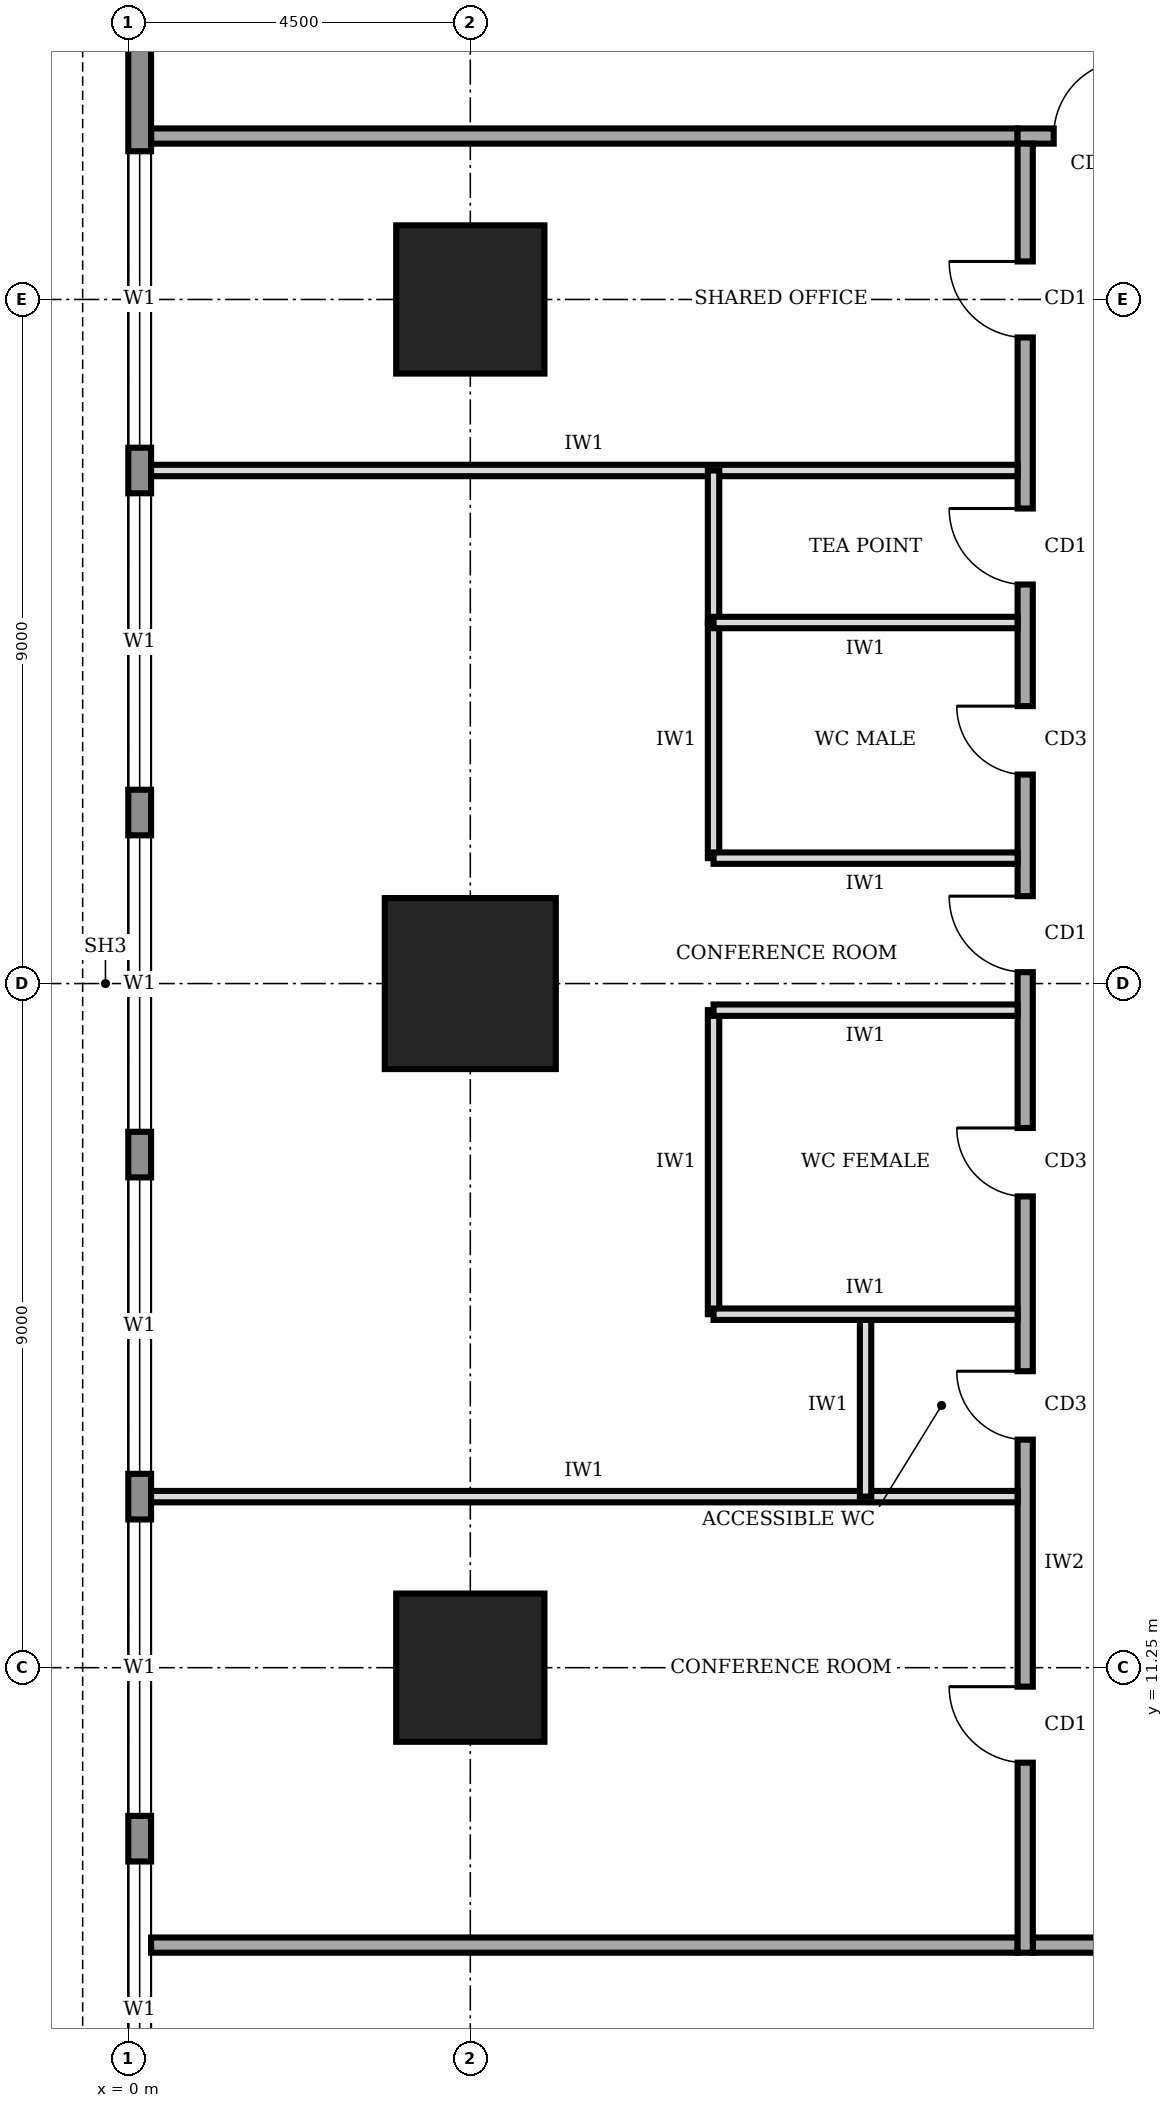
"""IFC4 building model, lengths in metres.
Left out: names, types, materials, properties, quantities, classifications, styles, units other than length and angle.
Written with IfcOpenShell. Run it as: python <this file> out.ifc"""

import sys

from ifc_helpers import new_model, si_unit, direction, frame, frame_2d, origin, origin_2d, place, context, subcontext, project, spatial, rectangle, extrude, element, fill, save


model = new_model("IFC4")
c1 = context("Model", 3, precision=1e-05, world=origin(), true_north=direction((0.0, 1.0)))
c2 = subcontext(c1, "Body", "Model", "MODEL_VIEW")
j1 = project(units=[si_unit("LENGTHUNIT", "METRE"), si_unit("PLANEANGLEUNIT", "RADIAN")], contexts=[c1])
p1 = place(None, origin())
s1 = spatial("IfcSite", under=j1, at=p1, CompositionType="ELEMENT")
p2 = place(p1, origin())
s2 = spatial("IfcBuilding", under=s1, at=p2, CompositionType="ELEMENT")
p3 = place(p2, frame((0.0, 0.0, 213.0)))
s3 = spatial("IfcBuildingStorey", under=s2, at=p3, CompositionType="ELEMENT", Elevation=213.0)
p4 = place(p3, frame((4.5, 11.25, 0.0), z_axis=(0.0, 0.0, 1.0), x_axis=(1.0, 0.0, 0.0)))
e1 = element("IfcColumn", 1, at=p4, inside=s3, PredefinedType="COLUMN", context=c2, shape_type="SweptSolid", body=[
    extrude(rectangle(XDim=1.95, YDim=1.95, at=origin_2d()), origin(), (0.0, 0.0, 1.0), 4.0),
])
p5 = place(p3, frame((4.5, 20.25, 0.0), z_axis=(0.0, 0.0, 1.0), x_axis=(1.0, 0.0, 0.0)))
e2 = element("IfcColumn", 2, at=p5, inside=s3, PredefinedType="COLUMN", context=c2, shape_type="SweptSolid", body=[
    extrude(rectangle(XDim=2.25, YDim=2.25, at=origin_2d()), origin(), (0.0, 0.0, 1.0), 4.0),
])
p6 = place(p3, frame((4.5, 29.25, 0.0), z_axis=(0.0, 0.0, 1.0), x_axis=(1.0, 0.0, 0.0)))
e3 = element("IfcColumn", 3, at=p6, inside=s3, PredefinedType="COLUMN", context=c2, shape_type="SweptSolid", body=[
    extrude(rectangle(XDim=1.95, YDim=1.95, at=origin_2d()), origin(), (0.0, 0.0, 1.0), 4.0),
])
p7 = place(p3, frame((0.15, 35.98, 0.0), z_axis=(0.0, 0.0, 1.0), x_axis=(0.0, -1.0, 0.0)))
e4 = element("IfcWall", 4, at=p7, inside=s3, PredefinedType="STANDARD", context=c2, shape_type="SweptSolid", body=[
    extrude(rectangle(XDim=31.46, YDim=0.3, at=frame_2d((15.73, 0.0))), origin(), (0.0, 0.0, 1.0), 3.75),
])
p8 = place(p7, frame((27.28, 0.0, 0.9)))
e5 = element("IfcOpeningElement", 5, at=p8, cuts=e4, PredefinedType="OPENING", context=c2, shape_type="SweptSolid", body=[
    extrude(rectangle(XDim=3.9, YDim=2.2, at=frame_2d((1.95, 1.1))), frame((0.0, 0.16, 0.0), z_axis=(0.0, -1.0, 0.0), x_axis=(1.0, 0.0, 0.0)), (0.0, 0.0, 1.0), 0.32),
])
p9 = place(p7, frame((22.78, 0.0, 0.9)))
e6 = element("IfcOpeningElement", 6, at=p9, cuts=e4, PredefinedType="OPENING", context=c2, shape_type="SweptSolid", body=[
    extrude(rectangle(XDim=3.9, YDim=2.2, at=frame_2d((1.95, 1.1))), frame((0.0, 0.16, 0.0), z_axis=(0.0, -1.0, 0.0), x_axis=(1.0, 0.0, 0.0)), (0.0, 0.0, 1.0), 0.32),
])
p10 = place(p7, frame((18.28, 0.0, 0.9)))
e7 = element("IfcOpeningElement", 7, at=p10, cuts=e4, PredefinedType="OPENING", context=c2, shape_type="SweptSolid", body=[
    extrude(rectangle(XDim=3.9, YDim=2.2, at=frame_2d((1.95, 1.1))), frame((0.0, 0.16, 0.0), z_axis=(0.0, -1.0, 0.0), x_axis=(1.0, 0.0, 0.0)), (0.0, 0.0, 1.0), 0.32),
])
p11 = place(p7, frame((13.78, 0.0, 0.9)))
e8 = element("IfcOpeningElement", 8, at=p11, cuts=e4, PredefinedType="OPENING", context=c2, shape_type="SweptSolid", body=[
    extrude(rectangle(XDim=3.9, YDim=2.2, at=frame_2d((1.95, 1.1))), frame((0.0, 0.16, 0.0), z_axis=(0.0, -1.0, 0.0), x_axis=(1.0, 0.0, 0.0)), (0.0, 0.0, 1.0), 0.32),
])
p12 = place(p7, frame((9.28, 0.0, 0.9)))
e9 = element("IfcOpeningElement", 9, at=p12, cuts=e4, PredefinedType="OPENING", context=c2, shape_type="SweptSolid", body=[
    extrude(rectangle(XDim=3.9, YDim=2.2, at=frame_2d((1.95, 1.1))), frame((0.0, 0.16, 0.0), z_axis=(0.0, -1.0, 0.0), x_axis=(1.0, 0.0, 0.0)), (0.0, 0.0, 1.0), 0.32),
])
p13 = place(p7, frame((4.78, 0.0, 0.9)))
e10 = element("IfcOpeningElement", 10, at=p13, cuts=e4, PredefinedType="OPENING", context=c2, shape_type="SweptSolid", body=[
    extrude(rectangle(XDim=3.9, YDim=2.2, at=frame_2d((1.95, 1.1))), frame((0.0, 0.16, 0.0), z_axis=(0.0, -1.0, 0.0), x_axis=(1.0, 0.0, 0.0)), (0.0, 0.0, 1.0), 0.32),
])
p14 = place(p3, frame((11.9, 7.6, 0.0), z_axis=(0.0, 0.0, 1.0), x_axis=(1.0, 0.0, 0.0)))
e11 = element("IfcWall", 11, at=p14, inside=s3, PredefinedType="SOLIDWALL", context=c2, shape_type="SweptSolid", body=[
    extrude(rectangle(XDim=16.9, YDim=0.2, at=frame_2d((8.45, 0.0))), origin(), (0.0, 0.0, 1.0), 3.75),
])
p15 = place(p3, frame((28.6, 31.4, 0.0), z_axis=(0.0, 0.0, 1.0), x_axis=(-1.0, 0.0, 0.0)))
e12 = element("IfcWall", 12, at=p15, inside=s3, PredefinedType="SOLIDWALL", context=c2, shape_type="SweptSolid", body=[
    extrude(rectangle(XDim=16.9, YDim=0.2, at=frame_2d((8.45, 0.0))), origin(), (0.0, 0.0, 1.0), 3.75),
])
p16 = place(p15, frame((15.425, 0.0, 0.0)))
e13 = element("IfcOpeningElement", 13, at=p16, cuts=e12, PredefinedType="OPENING", context=c2, shape_type="SweptSolid", body=[
    extrude(rectangle(XDim=1.0, YDim=2.1, at=frame_2d((0.5, 1.05))), frame((0.0, 0.11, 0.0), z_axis=(0.0, -1.0, 0.0), x_axis=(1.0, 0.0, 0.0)), (0.0, 0.0, 1.0), 0.22),
])
p17 = place(p15, frame((12.35, 0.0, 0.0)))
e14 = element("IfcOpeningElement", 14, at=p17, cuts=e12, PredefinedType="OPENING", context=c2, shape_type="SweptSolid", body=[
    extrude(rectangle(XDim=1.0, YDim=2.1, at=frame_2d((0.5, 1.05))), frame((0.0, 0.11, 0.0), z_axis=(0.0, -1.0, 0.0), x_axis=(1.0, 0.0, 0.0)), (0.0, 0.0, 1.0), 0.22),
])
p18 = place(p15, frame((5.6, 0.0, 0.0)))
e15 = element("IfcOpeningElement", 15, at=p18, cuts=e12, PredefinedType="OPENING", context=c2, shape_type="SweptSolid", body=[
    extrude(rectangle(XDim=1.0, YDim=2.1, at=frame_2d((0.5, 1.05))), frame((0.0, 0.11, 0.0), z_axis=(0.0, -1.0, 0.0), x_axis=(1.0, 0.0, 0.0)), (0.0, 0.0, 1.0), 0.22),
])
p19 = place(p15, frame((0.275, 0.0, 0.0)))
e16 = element("IfcOpeningElement", 16, at=p19, cuts=e12, PredefinedType="OPENING", context=c2, shape_type="SweptSolid", body=[
    extrude(rectangle(XDim=1.0, YDim=2.1, at=frame_2d((0.5, 1.05))), frame((0.0, 0.11, 0.0), z_axis=(0.0, -1.0, 0.0), x_axis=(1.0, 0.0, 0.0)), (0.0, 0.0, 1.0), 0.22),
])
p20 = place(p3, frame((11.8, 31.3, 0.0), z_axis=(0.0, 0.0, 1.0), x_axis=(0.0, -1.0, 0.0)))
e17 = element("IfcWall", 17, at=p20, inside=s3, PredefinedType="SOLIDWALL", context=c2, shape_type="SweptSolid", body=[
    extrude(rectangle(XDim=23.8, YDim=0.2, at=frame_2d((11.9, 0.0))), origin(), (0.0, 0.0, 1.0), 3.75),
])
p21 = place(p20, frame((20.3, 0.0, 0.0)))
e18 = element("IfcOpeningElement", 18, at=p21, cuts=e17, PredefinedType="OPENING", context=c2, shape_type="SweptSolid", body=[
    extrude(rectangle(XDim=1.0, YDim=2.1, at=frame_2d((0.5, 1.05))), frame((0.0, 0.11, 0.0), z_axis=(0.0, -1.0, 0.0), x_axis=(1.0, 0.0, 0.0)), (0.0, 0.0, 1.0), 0.22),
])
p22 = place(p20, frame((16.15, 0.0, 0.0)))
e19 = element("IfcOpeningElement", 19, at=p22, cuts=e17, PredefinedType="OPENING", context=c2, shape_type="SweptSolid", body=[
    extrude(rectangle(XDim=0.9, YDim=2.1, at=frame_2d((0.45, 1.05))), frame((0.0, 0.11, 0.0), z_axis=(0.0, -1.0, 0.0), x_axis=(1.0, 0.0, 0.0)), (0.0, 0.0, 1.0), 0.22),
])
p23 = place(p20, frame((12.95, 0.0, 0.0)))
e20 = element("IfcOpeningElement", 20, at=p23, cuts=e17, PredefinedType="OPENING", context=c2, shape_type="SweptSolid", body=[
    extrude(rectangle(XDim=0.9, YDim=2.1, at=frame_2d((0.45, 1.05))), frame((0.0, 0.11, 0.0), z_axis=(0.0, -1.0, 0.0), x_axis=(1.0, 0.0, 0.0)), (0.0, 0.0, 1.0), 0.22),
])
p24 = place(p20, frame((7.4, 0.0, 0.0)))
e21 = element("IfcOpeningElement", 21, at=p24, cuts=e17, PredefinedType="OPENING", context=c2, shape_type="SweptSolid", body=[
    extrude(rectangle(XDim=0.9, YDim=2.1, at=frame_2d((0.45, 1.05))), frame((0.0, 0.11, 0.0), z_axis=(0.0, -1.0, 0.0), x_axis=(1.0, 0.0, 0.0)), (0.0, 0.0, 1.0), 0.22),
])
p25 = place(p20, frame((4.8, 0.0, 0.0)))
e22 = element("IfcOpeningElement", 22, at=p25, cuts=e17, PredefinedType="OPENING", context=c2, shape_type="SweptSolid", body=[
    extrude(rectangle(XDim=1.0, YDim=2.1, at=frame_2d((0.5, 1.05))), frame((0.0, 0.11, 0.0), z_axis=(0.0, -1.0, 0.0), x_axis=(1.0, 0.0, 0.0)), (0.0, 0.0, 1.0), 0.22),
])
p26 = place(p20, frame((9.9, 0.0, 0.0)))
e23 = element("IfcOpeningElement", 23, at=p26, cuts=e17, PredefinedType="OPENING", context=c2, shape_type="SweptSolid", body=[
    extrude(rectangle(XDim=1.0, YDim=2.1, at=frame_2d((0.5, 1.05))), frame((0.0, 0.11, 0.0), z_axis=(0.0, -1.0, 0.0), x_axis=(1.0, 0.0, 0.0)), (0.0, 0.0, 1.0), 0.22),
])
p27 = place(p20, frame((1.55, 0.0, 0.0)))
e24 = element("IfcOpeningElement", 24, at=p27, cuts=e17, PredefinedType="OPENING", context=c2, shape_type="SweptSolid", body=[
    extrude(rectangle(XDim=1.0, YDim=2.1, at=frame_2d((0.5, 1.05))), frame((0.0, 0.11, 0.0), z_axis=(0.0, -1.0, 0.0), x_axis=(1.0, 0.0, 0.0)), (0.0, 0.0, 1.0), 0.22),
])
for number, where, z_axis, x_axis in (
    (25, (0.3, 7.6, 0.0), (0.0, 0.0, 1.0), (1.0, 0.0, 0.0)),
    (26, (0.3, 31.4, 0.0), (0.0, 0.0, 1.0), (1.0, 0.0, 0.0)),
):
    element("IfcWall", number, at=place(p3, frame(where, z_axis=z_axis, x_axis=x_axis)), inside=s3, PredefinedType="SOLIDWALL", context=c2, shape_type="SweptSolid", body=[
        extrude(rectangle(XDim=11.4, YDim=0.2, at=frame_2d((5.7, 0.0))), origin(), (0.0, 0.0, 1.0), 3.75),
    ])
for number, where, z_axis, x_axis in (
    (27, (0.3, 13.5, 0.0), (0.0, 0.0, 1.0), (1.0, 0.0, 0.0)),
    (28, (0.3, 27.0, 0.0), (0.0, 0.0, 1.0), (1.0, 0.0, 0.0)),
):
    element("IfcWall", number, at=place(p3, frame(where, z_axis=z_axis, x_axis=x_axis)), inside=s3, PredefinedType="PARTITIONING", context=c2, shape_type="SweptSolid", body=[
        extrude(rectangle(XDim=11.4, YDim=0.15, at=frame_2d((5.7, 0.0))), origin(), (0.0, 0.0, 1.0), 3.75),
    ])
p28 = place(p3, frame((11.7, 15.9, 0.0), z_axis=(0.0, 0.0, 1.0), x_axis=(-1.0, 0.0, 0.0)))
e29 = element("IfcWall", 29, at=p28, inside=s3, PredefinedType="PARTITIONING", context=c2, shape_type="SweptSolid", body=[
    extrude(rectangle(XDim=4.0, YDim=0.15, at=frame_2d((2.0, 0.0))), origin(), (0.0, 0.0, 1.0), 3.75),
])
p29 = place(p3, frame((11.7, 19.9, 0.0), z_axis=(0.0, 0.0, 1.0), x_axis=(-1.0, 0.0, 0.0)))
e30 = element("IfcWall", 30, at=p29, inside=s3, PredefinedType="PARTITIONING", context=c2, shape_type="SweptSolid", body=[
    extrude(rectangle(XDim=4.0, YDim=0.15, at=frame_2d((2.0, 0.0))), origin(), (0.0, 0.0, 1.0), 2.85),
])
for number, where, z_axis, x_axis in (
    (31, (11.7, 21.9, 0.0), (0.0, 0.0, 1.0), (-1.0, 0.0, 0.0)),
    (32, (11.7, 25.0, 0.0), (0.0, 0.0, 1.0), (-1.0, 0.0, 0.0)),
):
    element("IfcWall", number, at=place(p3, frame(where, z_axis=z_axis, x_axis=x_axis)), inside=s3, PredefinedType="PARTITIONING", context=c2, shape_type="SweptSolid", body=[
        extrude(rectangle(XDim=4.0, YDim=0.15, at=frame_2d((2.0, 0.0))), origin(), (0.0, 0.0, 1.0), 3.75),
    ])
p30 = place(p3, frame((9.7, 13.5, 0.0), z_axis=(0.0, 0.0, 1.0), x_axis=(0.0, 1.0, 0.0)))
e33 = element("IfcWall", 33, at=p30, inside=s3, PredefinedType="PARTITIONING", context=c2, shape_type="SweptSolid", body=[
    extrude(rectangle(XDim=2.4, YDim=0.15, at=frame_2d((1.2, 0.0))), origin(), (0.0, 0.0, 1.0), 3.75),
])
p31 = place(p3, frame((7.7, 15.9, 0.0), z_axis=(0.0, 0.0, 1.0), x_axis=(0.0, 1.0, 0.0)))
e34 = element("IfcWall", 34, at=p31, inside=s3, PredefinedType="PARTITIONING", context=c2, shape_type="SweptSolid", body=[
    extrude(rectangle(XDim=4.0, YDim=0.15, at=frame_2d((2.0, 0.0))), origin(), (0.0, 0.0, 1.0), 3.75),
])
p32 = place(p3, frame((7.7, 21.9, 0.0), z_axis=(0.0, 0.0, 1.0), x_axis=(0.0, 1.0, 0.0)))
e35 = element("IfcWall", 35, at=p32, inside=s3, PredefinedType="PARTITIONING", context=c2, shape_type="SweptSolid", body=[
    extrude(rectangle(XDim=3.1, YDim=0.15, at=frame_2d((1.55, 0.0))), origin(), (0.0, 0.0, 1.0), 3.75),
])
p33 = place(p3, frame((7.7, 25.0, 0.0), z_axis=(0.0, 0.0, 1.0), x_axis=(0.0, 1.0, 0.0)))
e36 = element("IfcWall", 36, at=p33, inside=s3, PredefinedType="PARTITIONING", context=c2, shape_type="SweptSolid", body=[
    extrude(rectangle(XDim=2.0, YDim=0.15, at=frame_2d((1.0, 0.0))), origin(), (0.0, 0.0, 1.0), 3.75),
])
p34 = place(p8, origin())
e37 = element("IfcWindow", 37, at=p34, inside=s3, PartitioningType="SINGLE_PANEL", PredefinedType="WINDOW", context=c2, shape_type="SweptSolid", body=[
    extrude(rectangle(XDim=3.9, YDim=2.2, at=frame_2d((1.95, 1.1))), frame((0.0, 0.03, 0.0), z_axis=(0.0, -1.0, 0.0), x_axis=(1.0, 0.0, 0.0)), (0.0, 0.0, 1.0), 0.06),
])
fill(e5, e37)
p35 = place(p9, origin())
e38 = element("IfcWindow", 38, at=p35, inside=s3, PartitioningType="SINGLE_PANEL", PredefinedType="WINDOW", context=c2, shape_type="SweptSolid", body=[
    extrude(rectangle(XDim=3.9, YDim=2.2, at=frame_2d((1.95, 1.1))), frame((0.0, 0.03, 0.0), z_axis=(0.0, -1.0, 0.0), x_axis=(1.0, 0.0, 0.0)), (0.0, 0.0, 1.0), 0.06),
])
fill(e6, e38)
p36 = place(p10, origin())
e39 = element("IfcWindow", 39, at=p36, inside=s3, PartitioningType="SINGLE_PANEL", PredefinedType="WINDOW", context=c2, shape_type="SweptSolid", body=[
    extrude(rectangle(XDim=3.9, YDim=2.2, at=frame_2d((1.95, 1.1))), frame((0.0, 0.03, 0.0), z_axis=(0.0, -1.0, 0.0), x_axis=(1.0, 0.0, 0.0)), (0.0, 0.0, 1.0), 0.06),
])
fill(e7, e39)
p37 = place(p11, origin())
e40 = element("IfcWindow", 40, at=p37, inside=s3, PartitioningType="SINGLE_PANEL", PredefinedType="WINDOW", context=c2, shape_type="SweptSolid", body=[
    extrude(rectangle(XDim=3.9, YDim=2.2, at=frame_2d((1.95, 1.1))), frame((0.0, 0.03, 0.0), z_axis=(0.0, -1.0, 0.0), x_axis=(1.0, 0.0, 0.0)), (0.0, 0.0, 1.0), 0.06),
])
fill(e8, e40)
p38 = place(p12, origin())
e41 = element("IfcWindow", 41, at=p38, inside=s3, PartitioningType="SINGLE_PANEL", PredefinedType="WINDOW", context=c2, shape_type="SweptSolid", body=[
    extrude(rectangle(XDim=3.9, YDim=2.2, at=frame_2d((1.95, 1.1))), frame((0.0, 0.03, 0.0), z_axis=(0.0, -1.0, 0.0), x_axis=(1.0, 0.0, 0.0)), (0.0, 0.0, 1.0), 0.06),
])
fill(e9, e41)
p39 = place(p13, origin())
e42 = element("IfcWindow", 42, at=p39, inside=s3, PartitioningType="SINGLE_PANEL", PredefinedType="WINDOW", context=c2, shape_type="SweptSolid", body=[
    extrude(rectangle(XDim=3.9, YDim=2.2, at=frame_2d((1.95, 1.1))), frame((0.0, 0.03, 0.0), z_axis=(0.0, -1.0, 0.0), x_axis=(1.0, 0.0, 0.0)), (0.0, 0.0, 1.0), 0.06),
])
fill(e10, e42)
p40 = place(p16, frame((1.0, 0.0, 0.0), z_axis=(0.0, 0.0, 1.0), x_axis=(-1.0, 0.0, 0.0)))
e43 = element("IfcDoor", 43, at=p40, inside=s3, OperationType="SINGLE_SWING_RIGHT", PredefinedType="DOOR", context=c2, shape_type="SweptSolid", body=[
    extrude(rectangle(XDim=1.0, YDim=2.1, at=frame_2d((0.5, 1.05))), frame((0.0, 0.025, 0.0), z_axis=(0.0, -1.0, 0.0), x_axis=(1.0, 0.0, 0.0)), (0.0, 0.0, 1.0), 0.05),
])
fill(e13, e43)
p41 = place(p21, frame((1.0, 0.0, 0.0), z_axis=(0.0, 0.0, 1.0), x_axis=(-1.0, 0.0, 0.0)))
e44 = element("IfcDoor", 44, at=p41, inside=s3, OperationType="SINGLE_SWING_RIGHT", PredefinedType="DOOR", context=c2, shape_type="SweptSolid", body=[
    extrude(rectangle(XDim=1.0, YDim=2.1, at=frame_2d((0.5, 1.05))), frame((0.0, 0.025, 0.0), z_axis=(0.0, -1.0, 0.0), x_axis=(1.0, 0.0, 0.0)), (0.0, 0.0, 1.0), 0.05),
])
fill(e18, e44)
p42 = place(p22, frame((0.9, 0.0, 0.0), z_axis=(0.0, 0.0, 1.0), x_axis=(-1.0, 0.0, 0.0)))
e45 = element("IfcDoor", 45, at=p42, inside=s3, OperationType="SINGLE_SWING_RIGHT", PredefinedType="DOOR", context=c2, shape_type="SweptSolid", body=[
    extrude(rectangle(XDim=0.9, YDim=2.1, at=frame_2d((0.45, 1.05))), frame((0.0, 0.025, 0.0), z_axis=(0.0, -1.0, 0.0), x_axis=(1.0, 0.0, 0.0)), (0.0, 0.0, 1.0), 0.05),
])
fill(e19, e45)
p43 = place(p23, frame((0.9, 0.0, 0.0), z_axis=(0.0, 0.0, 1.0), x_axis=(-1.0, 0.0, 0.0)))
e46 = element("IfcDoor", 46, at=p43, inside=s3, OperationType="SINGLE_SWING_RIGHT", PredefinedType="DOOR", context=c2, shape_type="SweptSolid", body=[
    extrude(rectangle(XDim=0.9, YDim=2.1, at=frame_2d((0.45, 1.05))), frame((0.0, 0.025, 0.0), z_axis=(0.0, -1.0, 0.0), x_axis=(1.0, 0.0, 0.0)), (0.0, 0.0, 1.0), 0.05),
])
fill(e20, e46)
p44 = place(p24, frame((0.9, 0.0, 0.0), z_axis=(0.0, 0.0, 1.0), x_axis=(-1.0, 0.0, 0.0)))
e47 = element("IfcDoor", 47, at=p44, inside=s3, OperationType="SINGLE_SWING_RIGHT", PredefinedType="DOOR", context=c2, shape_type="SweptSolid", body=[
    extrude(rectangle(XDim=0.9, YDim=2.1, at=frame_2d((0.45, 1.05))), frame((0.0, 0.025, 0.0), z_axis=(0.0, -1.0, 0.0), x_axis=(1.0, 0.0, 0.0)), (0.0, 0.0, 1.0), 0.05),
])
fill(e21, e47)
p45 = place(p25, frame((1.0, 0.0, 0.0), z_axis=(0.0, 0.0, 1.0), x_axis=(-1.0, 0.0, 0.0)))
e48 = element("IfcDoor", 48, at=p45, inside=s3, OperationType="SINGLE_SWING_RIGHT", PredefinedType="DOOR", context=c2, shape_type="SweptSolid", body=[
    extrude(rectangle(XDim=1.0, YDim=2.1, at=frame_2d((0.5, 1.05))), frame((0.0, 0.025, 0.0), z_axis=(0.0, -1.0, 0.0), x_axis=(1.0, 0.0, 0.0)), (0.0, 0.0, 1.0), 0.05),
])
fill(e22, e48)
p46 = place(p26, frame((1.0, 0.0, 0.0), z_axis=(0.0, 0.0, 1.0), x_axis=(-1.0, 0.0, 0.0)))
e49 = element("IfcDoor", 49, at=p46, inside=s3, OperationType="SINGLE_SWING_RIGHT", PredefinedType="DOOR", context=c2, shape_type="SweptSolid", body=[
    extrude(rectangle(XDim=1.0, YDim=2.1, at=frame_2d((0.5, 1.05))), frame((0.0, 0.025, 0.0), z_axis=(0.0, -1.0, 0.0), x_axis=(1.0, 0.0, 0.0)), (0.0, 0.0, 1.0), 0.05),
])
fill(e23, e49)
p47 = place(p27, frame((1.0, 0.0, 0.0), z_axis=(0.0, 0.0, 1.0), x_axis=(-1.0, 0.0, 0.0)))
e50 = element("IfcDoor", 50, at=p47, inside=s3, OperationType="SINGLE_SWING_RIGHT", PredefinedType="DOOR", context=c2, shape_type="SweptSolid", body=[
    extrude(rectangle(XDim=1.0, YDim=2.1, at=frame_2d((0.5, 1.05))), frame((0.0, 0.025, 0.0), z_axis=(0.0, -1.0, 0.0), x_axis=(1.0, 0.0, 0.0)), (0.0, 0.0, 1.0), 0.05),
])
fill(e24, e50)
save(model, sys.argv[1])
